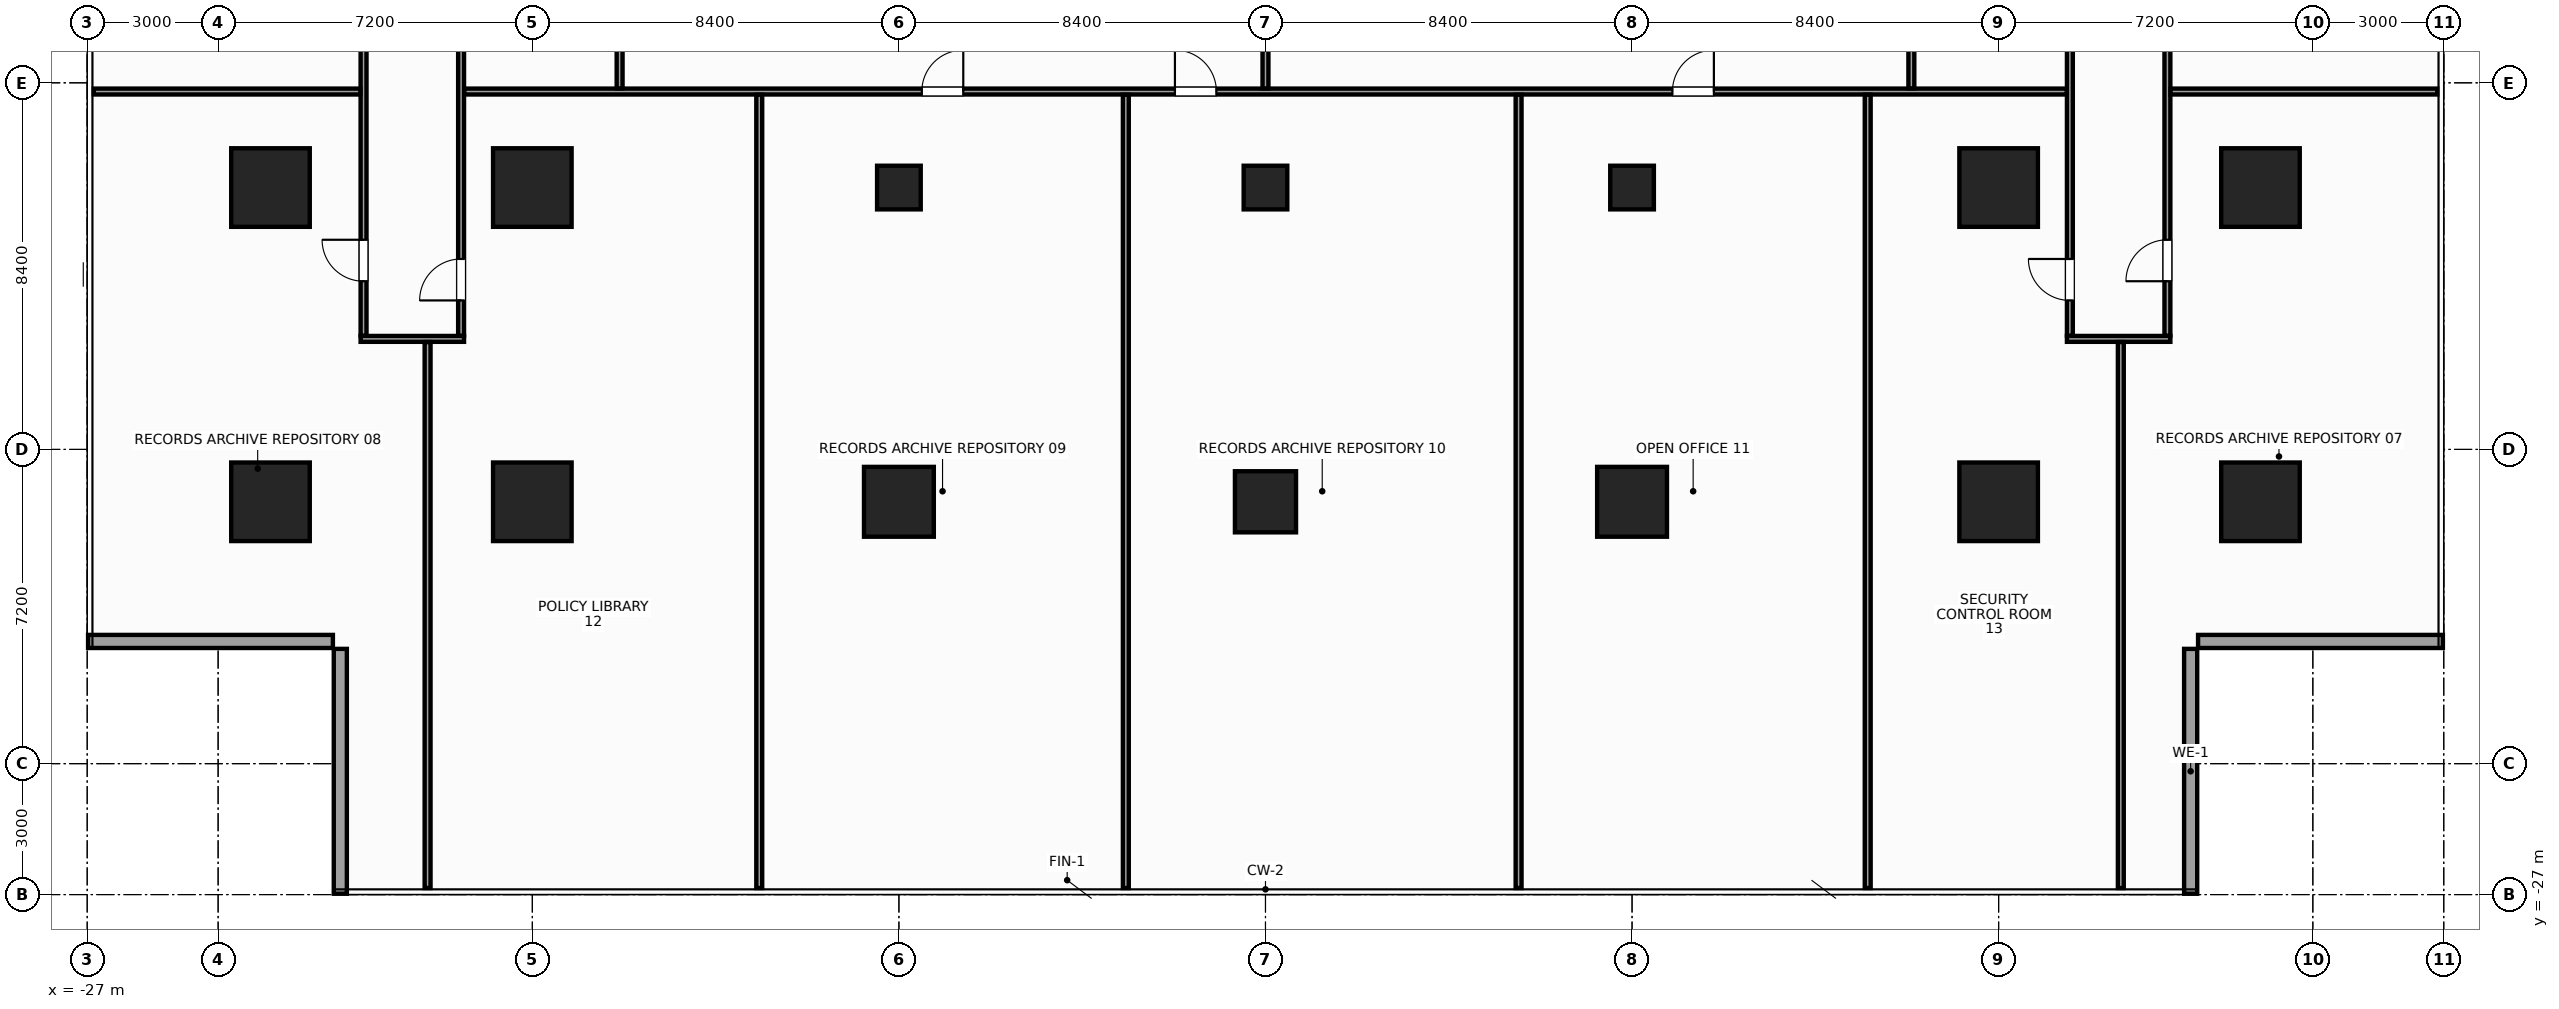
"""IFC4 building model, lengths in metres.
Left out: names, types, materials, properties, quantities, classifications, styles, units other than length and angle.
Written with IfcOpenShell. Run it as: python <this file> out.ifc"""

import sys

from ifc_helpers import new_model, si_unit, direction, frame, frame_2d, origin, origin_2d, place, context, subcontext, project, spatial, rectangle, hollow_rectangle, extrude, source, transform, mapped, element, fill, save


model = new_model("IFC4")
c1 = context("Model", 3, precision=1e-05, world=origin(), true_north=direction((0.0, 1.0)))
c2 = subcontext(c1, "Body", "Model", "MODEL_VIEW")
j1 = project(units=[si_unit("LENGTHUNIT", "METRE"), si_unit("PLANEANGLEUNIT", "RADIAN")], contexts=[c1])
p1 = place(None, origin())
s1 = spatial("IfcSite", under=j1, at=p1, CompositionType="ELEMENT")
p2 = place(p1, origin())
s2 = spatial("IfcBuilding", under=s1, at=p2, CompositionType="ELEMENT")
p3 = place(p2, frame((0.0, 0.0, 41.6)))
s3 = spatial("IfcBuildingStorey", under=s2, at=p3, CompositionType="ELEMENT", Elevation=41.6)
m1 = source(origin(), c2, "Body", "SweptSolid", [
    extrude(rectangle(XDim=1.8, YDim=1.8, at=origin_2d()), origin(), (0.0, 0.0, 1.0), 3.6),
])
for number, where, z_axis, x_axis in (
    (1, (-16.8, -18.0, 0.0), (0.0, 0.0, 1.0), (1.0, 0.0, 0.0)),
    (2, (-16.8, -10.8, 0.0), (0.0, 0.0, 1.0), (1.0, 0.0, 0.0)),
    (3, (16.8, -18.0, 0.0), (0.0, 0.0, 1.0), (1.0, 0.0, 0.0)),
    (4, (16.8, -10.8, 0.0), (0.0, 0.0, 1.0), (1.0, 0.0, 0.0)),
    (5, (-22.8, -18.0, 0.0), (0.0, 0.0, 1.0), (1.0, 0.0, 0.0)),
    (6, (-22.8, -10.8, 0.0), (0.0, 0.0, 1.0), (1.0, 0.0, 0.0)),
    (7, (22.8, -18.0, 0.0), (0.0, 0.0, 1.0), (1.0, 0.0, 0.0)),
    (8, (22.8, -10.8, 0.0), (0.0, 0.0, 1.0), (1.0, 0.0, 0.0)),
):
    element("IfcColumn", number, at=place(p3, frame(where, z_axis=z_axis, x_axis=x_axis)), inside=s3, PredefinedType="COLUMN", context=c2, shape_type="MappedRepresentation", body=[
        mapped(m1, transform((0.0, 0.0, 0.0), x_axis=(1.0, 0.0, 0.0), y_axis=(0.0, 1.0, 0.0), z_axis=(0.0, 0.0, 1.0), scale=1.0)),
    ])
m2 = source(origin(), c2, "Body", "SweptSolid", [
    extrude(rectangle(XDim=1.6, YDim=1.6, at=origin_2d()), origin(), (0.0, 0.0, 1.0), 3.6),
])
p4 = place(p3, frame((-8.4, -18.0, 0.0), z_axis=(0.0, 0.0, 1.0), x_axis=(1.0, 0.0, 0.0)))
e9 = element("IfcColumn", 9, at=p4, inside=s3, PredefinedType="COLUMN", context=c2, shape_type="MappedRepresentation", body=[
    mapped(m2, transform((0.0, 0.0, 0.0), x_axis=(1.0, 0.0, 0.0), y_axis=(0.0, 1.0, 0.0), z_axis=(0.0, 0.0, 1.0), scale=1.0)),
])
m3 = source(origin(), c2, "Body", "SweptSolid", [
    extrude(hollow_rectangle(XDim=1.0, YDim=1.0, WallThickness=0.045, at=origin_2d()), origin(), (0.0, 0.0, 1.0), 3.6),
])
p5 = place(p3, frame((-8.4, -10.8, 0.0), z_axis=(0.0, 0.0, 1.0), x_axis=(1.0, 0.0, 0.0)))
e10 = element("IfcColumn", 10, at=p5, inside=s3, PredefinedType="COLUMN", context=c2, shape_type="MappedRepresentation", body=[
    mapped(m3, transform((0.0, 0.0, 0.0), x_axis=(1.0, 0.0, 0.0), y_axis=(0.0, 1.0, 0.0), z_axis=(0.0, 0.0, 1.0), scale=1.0)),
])
p6 = place(p3, frame((8.4, -18.0, 0.0), z_axis=(0.0, 0.0, 1.0), x_axis=(1.0, 0.0, 0.0)))
e11 = element("IfcColumn", 11, at=p6, inside=s3, PredefinedType="COLUMN", context=c2, shape_type="MappedRepresentation", body=[
    mapped(m2, transform((0.0, 0.0, 0.0), x_axis=(1.0, 0.0, 0.0), y_axis=(0.0, 1.0, 0.0), z_axis=(0.0, 0.0, 1.0), scale=1.0)),
])
p7 = place(p3, frame((8.4, -10.8, 0.0), z_axis=(0.0, 0.0, 1.0), x_axis=(1.0, 0.0, 0.0)))
e12 = element("IfcColumn", 12, at=p7, inside=s3, PredefinedType="COLUMN", context=c2, shape_type="MappedRepresentation", body=[
    mapped(m3, transform((0.0, 0.0, 0.0), x_axis=(1.0, 0.0, 0.0), y_axis=(0.0, 1.0, 0.0), z_axis=(0.0, 0.0, 1.0), scale=1.0)),
])
m4 = source(origin(), c2, "Body", "SweptSolid", [
    extrude(rectangle(XDim=1.4, YDim=1.4, at=origin_2d()), origin(), (0.0, 0.0, 1.0), 3.6),
])
p8 = place(p3, frame((0.0, -18.0, 0.0), z_axis=(0.0, 0.0, 1.0), x_axis=(1.0, 0.0, 0.0)))
e13 = element("IfcColumn", 13, at=p8, inside=s3, PredefinedType="COLUMN", context=c2, shape_type="MappedRepresentation", body=[
    mapped(m4, transform((0.0, 0.0, 0.0), x_axis=(1.0, 0.0, 0.0), y_axis=(0.0, 1.0, 0.0), z_axis=(0.0, 0.0, 1.0), scale=1.0)),
])
m5 = source(origin(), c2, "Body", "SweptSolid", [
    extrude(rectangle(XDim=1.0, YDim=1.0, at=origin_2d()), origin(), (0.0, 0.0, 1.0), 3.6),
])
p9 = place(p3, frame((0.0, -10.8, 0.0), z_axis=(0.0, 0.0, 1.0), x_axis=(1.0, 0.0, 0.0)))
e14 = element("IfcColumn", 14, at=p9, inside=s3, PredefinedType="COLUMN", context=c2, shape_type="MappedRepresentation", body=[
    mapped(m5, transform((0.0, 0.0, 0.0), x_axis=(1.0, 0.0, 0.0), y_axis=(0.0, 1.0, 0.0), z_axis=(0.0, 0.0, 1.0), scale=1.0)),
])
m6 = source(origin(), c2, "Body", "SweptSolid", [
    extrude(rectangle(XDim=5.61, YDim=0.3, at=frame_2d((2.805, 0.0))), origin(), (0.0, 0.0, 1.0), 2.74),
])
for number, where, z_axis, x_axis in (
    (15, (21.2, -26.98, 0.0), (0.0, 0.0, 1.0), (0.0, 1.0, 0.0)),
    (16, (21.37, -21.2, 0.0), (0.0, 0.0, 1.0), (1.0, 0.0, 0.0)),
    (17, (-26.98, -21.2, 0.0), (0.0, 0.0, 1.0), (1.0, 0.0, 0.0)),
    (18, (-21.2, -21.37, 0.0), (0.0, 0.0, 1.0), (0.0, -1.0, 0.0)),
):
    element("IfcWall", number, at=place(p3, frame(where, z_axis=z_axis, x_axis=x_axis)), inside=s3, PredefinedType="STANDARD", context=c2, shape_type="MappedRepresentation", body=[
        mapped(m6, transform((0.0, 0.0, 0.0), x_axis=(1.0, 0.0, 0.0), y_axis=(0.0, 1.0, 0.0), z_axis=(0.0, 0.0, 1.0), scale=1.0)),
    ])
m7 = source(origin(), c2, "Body", "SweptSolid", [
    extrude(rectangle(XDim=2.37, YDim=0.135, at=frame_2d((1.185, 0.0))), origin(), (0.0, 0.0, 1.0), 2.845),
])
for number, where, z_axis, x_axis in (
    (19, (-20.735, -14.268, 0.0), (0.0, 0.0, 1.0), (1.0, 0.0, 0.0)),
    (20, (18.365, -14.268, 0.0), (0.0, 0.0, 1.0), (1.0, 0.0, 0.0)),
):
    element("IfcWall", number, at=place(p3, frame(where, z_axis=z_axis, x_axis=x_axis)), inside=s3, PredefinedType="PARTITIONING", context=c2, shape_type="MappedRepresentation", body=[
        mapped(m7, transform((0.0, 0.0, 0.0), x_axis=(1.0, 0.0, 0.0), y_axis=(0.0, 1.0, 0.0), z_axis=(0.0, 0.0, 1.0), scale=1.0)),
    ])
m8 = source(origin(), c2, "Body", "SweptSolid", [
    extrude(rectangle(XDim=24.123, YDim=0.135, at=frame_2d((12.061, 0.0))), origin(), (0.0, 0.0, 1.0), 2.745),
])
p10 = place(p3, frame((-20.667, -14.195, 0.0), z_axis=(0.0, 0.0, 1.0), x_axis=(0.0, 1.0, 0.0)))
e21 = element("IfcWall", 21, at=p10, inside=s3, PredefinedType="PARTITIONING", context=c2, shape_type="MappedRepresentation", body=[
    mapped(m8, transform((0.0, 0.0, 0.0), x_axis=(1.0, 0.0, 0.0), y_axis=(0.0, 1.0, 0.0), z_axis=(0.0, 0.0, 1.0), scale=1.0)),
])
p11 = place(p10, frame((15.238, 0.0, 0.0)))
e22 = element("IfcOpeningElement", 22, at=p11, cuts=e21, PredefinedType="OPENING", context=c2, shape_type="SweptSolid", body=[
    extrude(rectangle(XDim=0.95, YDim=2.15, at=frame_2d((0.475, 1.075))), frame((0.0, 0.08, 0.0), z_axis=(0.0, -1.0, 0.0), x_axis=(1.0, 0.0, 0.0)), (0.0, 0.0, 1.0), 0.159),
])
p12 = place(p10, frame((1.249, 0.0, 0.0)))
e23 = element("IfcOpeningElement", 23, at=p12, cuts=e21, PredefinedType="OPENING", context=c2, shape_type="SweptSolid", body=[
    extrude(rectangle(XDim=0.95, YDim=2.15, at=frame_2d((0.475, 1.075))), frame((0.0, 0.08, 0.0), z_axis=(0.0, -1.0, 0.0), x_axis=(1.0, 0.0, 0.0)), (0.0, 0.0, 1.0), 0.159),
])
m9 = source(origin(), c2, "Body", "SweptSolid", [
    extrude(rectangle(XDim=21.995, YDim=0.135, at=frame_2d((10.998, 0.0))), origin(), (0.0, 0.0, 1.0), 2.745),
])
p13 = place(p3, frame((-18.433, -14.195, 0.0), z_axis=(0.0, 0.0, 1.0), x_axis=(0.0, 1.0, 0.0)))
e24 = element("IfcWall", 24, at=p13, inside=s3, PredefinedType="PARTITIONING", context=c2, shape_type="MappedRepresentation", body=[
    mapped(m9, transform((0.0, 0.0, 0.0), x_axis=(1.0, 0.0, 0.0), y_axis=(0.0, 1.0, 0.0), z_axis=(0.0, 0.0, 1.0), scale=1.0)),
])
p14 = place(p13, frame((0.809, 0.0, 0.0)))
e25 = element("IfcOpeningElement", 25, at=p14, cuts=e24, PredefinedType="OPENING", context=c2, shape_type="SweptSolid", body=[
    extrude(rectangle(XDim=0.95, YDim=2.15, at=frame_2d((0.475, 1.075))), frame((0.0, 0.08, 0.0), z_axis=(0.0, -1.0, 0.0), x_axis=(1.0, 0.0, 0.0)), (0.0, 0.0, 1.0), 0.159),
])
p15 = place(p3, frame((18.433, -14.195, 0.0), z_axis=(0.0, 0.0, 1.0), x_axis=(0.0, 1.0, 0.0)))
e26 = element("IfcWall", 26, at=p15, inside=s3, PredefinedType="PARTITIONING", context=c2, shape_type="MappedRepresentation", body=[
    mapped(m9, transform((0.0, 0.0, 0.0), x_axis=(1.0, 0.0, 0.0), y_axis=(0.0, 1.0, 0.0), z_axis=(0.0, 0.0, 1.0), scale=1.0)),
])
p16 = place(p15, frame((0.809, 0.0, 0.0)))
e27 = element("IfcOpeningElement", 27, at=p16, cuts=e26, PredefinedType="OPENING", context=c2, shape_type="SweptSolid", body=[
    extrude(rectangle(XDim=0.95, YDim=2.15, at=frame_2d((0.475, 1.075))), frame((0.0, 0.08, 0.0), z_axis=(0.0, -1.0, 0.0), x_axis=(1.0, 0.0, 0.0)), (0.0, 0.0, 1.0), 0.159),
])
p17 = place(p3, frame((20.667, -14.195, 0.0), z_axis=(0.0, 0.0, 1.0), x_axis=(0.0, 1.0, 0.0)))
e28 = element("IfcWall", 28, at=p17, inside=s3, PredefinedType="PARTITIONING", context=c2, shape_type="MappedRepresentation", body=[
    mapped(m8, transform((0.0, 0.0, 0.0), x_axis=(1.0, 0.0, 0.0), y_axis=(0.0, 1.0, 0.0), z_axis=(0.0, 0.0, 1.0), scale=1.0)),
])
p18 = place(p17, frame((15.238, 0.0, 0.0)))
e29 = element("IfcOpeningElement", 29, at=p18, cuts=e28, PredefinedType="OPENING", context=c2, shape_type="SweptSolid", body=[
    extrude(rectangle(XDim=0.95, YDim=2.15, at=frame_2d((0.475, 1.075))), frame((0.0, 0.08, 0.0), z_axis=(0.0, -1.0, 0.0), x_axis=(1.0, 0.0, 0.0)), (0.0, 0.0, 1.0), 0.159),
])
p19 = place(p17, frame((1.249, 0.0, 0.0)))
e30 = element("IfcOpeningElement", 30, at=p19, cuts=e28, PredefinedType="OPENING", context=c2, shape_type="SweptSolid", body=[
    extrude(rectangle(XDim=0.95, YDim=2.15, at=frame_2d((0.475, 1.075))), frame((0.0, 0.08, 0.0), z_axis=(0.0, -1.0, 0.0), x_axis=(1.0, 0.0, 0.0)), (0.0, 0.0, 1.0), 0.159),
])
m10 = source(origin(), c2, "Body", "SweptSolid", [
    extrude(rectangle(XDim=6.11, YDim=0.135, at=frame_2d((3.055, 0.0))), origin(), (0.0, 0.0, 1.0), 2.745),
])
p20 = place(p3, frame((-26.85, -8.6, 0.0), z_axis=(0.0, 0.0, 1.0), x_axis=(1.0, 0.0, 0.0)))
e31 = element("IfcWall", 31, at=p20, inside=s3, PredefinedType="PARTITIONING", context=c2, shape_type="MappedRepresentation", body=[
    mapped(m10, transform((0.0, 0.0, 0.0), x_axis=(1.0, 0.0, 0.0), y_axis=(0.0, 1.0, 0.0), z_axis=(0.0, 0.0, 1.0), scale=1.0)),
])
m11 = source(origin(), c2, "Body", "SweptSolid", [
    extrude(rectangle(XDim=36.72, YDim=0.135, at=frame_2d((18.36, 0.0))), origin(), (0.0, 0.0, 1.0), 2.745),
])
p21 = place(p3, frame((-18.36, -8.6, 0.0), z_axis=(0.0, 0.0, 1.0), x_axis=(1.0, 0.0, 0.0)))
e32 = element("IfcWall", 32, at=p21, inside=s3, PredefinedType="PARTITIONING", context=c2, shape_type="MappedRepresentation", body=[
    mapped(m11, transform((0.0, 0.0, 0.0), x_axis=(1.0, 0.0, 0.0), y_axis=(0.0, 1.0, 0.0), z_axis=(0.0, 0.0, 1.0), scale=1.0)),
])
p22 = place(p21, frame((10.485, 0.0, 0.0)))
e33 = element("IfcOpeningElement", 33, at=p22, cuts=e32, PredefinedType="OPENING", context=c2, shape_type="SweptSolid", body=[
    extrude(rectangle(XDim=0.95, YDim=2.15, at=frame_2d((0.475, 1.075))), frame((0.0, 0.08, 0.0), z_axis=(0.0, -1.0, 0.0), x_axis=(1.0, 0.0, 0.0)), (0.0, 0.0, 1.0), 0.159),
])
p23 = place(p21, frame((16.285, 0.0, 0.0)))
e34 = element("IfcOpeningElement", 34, at=p23, cuts=e32, PredefinedType="OPENING", context=c2, shape_type="SweptSolid", body=[
    extrude(rectangle(XDim=0.95, YDim=2.15, at=frame_2d((0.475, 1.075))), frame((0.0, 0.08, 0.0), z_axis=(0.0, -1.0, 0.0), x_axis=(1.0, 0.0, 0.0)), (0.0, 0.0, 1.0), 0.159),
])
p24 = place(p21, frame((27.685, 0.0, 0.0)))
e35 = element("IfcOpeningElement", 35, at=p24, cuts=e32, PredefinedType="OPENING", context=c2, shape_type="SweptSolid", body=[
    extrude(rectangle(XDim=0.95, YDim=2.15, at=frame_2d((0.475, 1.075))), frame((0.0, 0.08, 0.0), z_axis=(0.0, -1.0, 0.0), x_axis=(1.0, 0.0, 0.0)), (0.0, 0.0, 1.0), 0.159),
])
p25 = place(p3, frame((20.74, -8.6, 0.0), z_axis=(0.0, 0.0, 1.0), x_axis=(1.0, 0.0, 0.0)))
e36 = element("IfcWall", 36, at=p25, inside=s3, PredefinedType="PARTITIONING", context=c2, shape_type="MappedRepresentation", body=[
    mapped(m10, transform((0.0, 0.0, 0.0), x_axis=(1.0, 0.0, 0.0), y_axis=(0.0, 1.0, 0.0), z_axis=(0.0, 0.0, 1.0), scale=1.0)),
])
m12 = source(origin(), c2, "Body", "SweptSolid", [
    extrude(rectangle(XDim=16.188, YDim=0.135, at=frame_2d((8.094, 0.0))), origin(), (0.0, 0.0, 1.0), 2.37),
])
p26 = place(p3, frame((-14.8, -8.528, 0.0), z_axis=(0.0, 0.0, 1.0), x_axis=(0.0, 1.0, 0.0)))
e37 = element("IfcWall", 37, at=p26, inside=s3, PredefinedType="PARTITIONING", context=c2, shape_type="MappedRepresentation", body=[
    mapped(m12, transform((0.0, 0.0, 0.0), x_axis=(1.0, 0.0, 0.0), y_axis=(0.0, 1.0, 0.0), z_axis=(0.0, 0.0, 1.0), scale=1.0)),
])
m13 = source(origin(), c2, "Body", "SweptSolid", [
    extrude(rectangle(XDim=8.018, YDim=0.135, at=frame_2d((4.009, 0.0))), origin(), (0.0, 0.0, 1.0), 2.745),
])
p27 = place(p3, frame((0.0, -8.528, 0.0), z_axis=(0.0, 0.0, 1.0), x_axis=(0.0, 1.0, 0.0)))
e38 = element("IfcWall", 38, at=p27, inside=s3, PredefinedType="PARTITIONING", context=c2, shape_type="MappedRepresentation", body=[
    mapped(m13, transform((0.0, 0.0, 0.0), x_axis=(1.0, 0.0, 0.0), y_axis=(0.0, 1.0, 0.0), z_axis=(0.0, 0.0, 1.0), scale=1.0)),
])
p28 = place(p3, frame((14.8, -8.528, 0.0), z_axis=(0.0, 0.0, 1.0), x_axis=(0.0, 1.0, 0.0)))
e39 = element("IfcWall", 39, at=p28, inside=s3, PredefinedType="PARTITIONING", context=c2, shape_type="MappedRepresentation", body=[
    mapped(m12, transform((0.0, 0.0, 0.0), x_axis=(1.0, 0.0, 0.0), y_axis=(0.0, 1.0, 0.0), z_axis=(0.0, 0.0, 1.0), scale=1.0)),
])
m14 = source(origin(), c2, "Body", "SweptSolid", [
    extrude(rectangle(XDim=12.51, YDim=0.135, at=frame_2d((6.255, 0.0))), origin(), (0.0, 0.0, 1.0), 2.745),
])
p29 = place(p3, frame((-19.2, -26.85, 0.0), z_axis=(0.0, 0.0, 1.0), x_axis=(0.0, 1.0, 0.0)))
e40 = element("IfcWall", 40, at=p29, inside=s3, PredefinedType="PARTITIONING", context=c2, shape_type="MappedRepresentation", body=[
    mapped(m14, transform((0.0, 0.0, 0.0), x_axis=(1.0, 0.0, 0.0), y_axis=(0.0, 1.0, 0.0), z_axis=(0.0, 0.0, 1.0), scale=1.0)),
])
m15 = source(origin(), c2, "Body", "SweptSolid", [
    extrude(rectangle(XDim=18.177, YDim=0.135, at=frame_2d((9.089, 0.0))), origin(), (0.0, 0.0, 1.0), 2.745),
])
for number, where, z_axis, x_axis in (
    (41, (-11.6, -26.85, 0.0), (0.0, 0.0, 1.0), (0.0, 1.0, 0.0)),
    (42, (-3.2, -26.85, 0.0), (0.0, 0.0, 1.0), (0.0, 1.0, 0.0)),
    (43, (5.8, -26.85, 0.0), (0.0, 0.0, 1.0), (0.0, 1.0, 0.0)),
    (44, (13.8, -26.85, 0.0), (0.0, 0.0, 1.0), (0.0, 1.0, 0.0)),
):
    element("IfcWall", number, at=place(p3, frame(where, z_axis=z_axis, x_axis=x_axis)), inside=s3, PredefinedType="PARTITIONING", context=c2, shape_type="MappedRepresentation", body=[
        mapped(m15, transform((0.0, 0.0, 0.0), x_axis=(1.0, 0.0, 0.0), y_axis=(0.0, 1.0, 0.0), z_axis=(0.0, 0.0, 1.0), scale=1.0)),
    ])
p30 = place(p3, frame((19.6, -26.85, 0.0), z_axis=(0.0, 0.0, 1.0), x_axis=(0.0, 1.0, 0.0)))
e45 = element("IfcWall", 45, at=p30, inside=s3, PredefinedType="PARTITIONING", context=c2, shape_type="MappedRepresentation", body=[
    mapped(m14, transform((0.0, 0.0, 0.0), x_axis=(1.0, 0.0, 0.0), y_axis=(0.0, 1.0, 0.0), z_axis=(0.0, 0.0, 1.0), scale=1.0)),
])
m16 = source(origin(), c2, "Body", "SweptSolid", [
    extrude(rectangle(XDim=0.95, YDim=2.15, at=frame_2d((0.475, 1.075))), frame((0.0, 0.025, 0.0), z_axis=(0.0, -1.0, 0.0), x_axis=(1.0, 0.0, 0.0)), (0.0, 0.0, 1.0), 0.05),
])
p31 = place(p19, origin())
e46 = element("IfcDoor", 46, at=p31, inside=s3, OperationType="SINGLE_SWING_LEFT", PredefinedType="DOOR", context=c2, shape_type="MappedRepresentation", body=[
    mapped(m16, transform((0.0, 0.0, 0.0), x_axis=(1.0, 0.0, 0.0), y_axis=(0.0, 1.0, 0.0), z_axis=(0.0, 0.0, 1.0), scale=1.0)),
])
fill(e30, e46)
p32 = place(p12, origin())
e47 = element("IfcDoor", 47, at=p32, inside=s3, OperationType="SINGLE_SWING_RIGHT", PredefinedType="DOOR", context=c2, shape_type="MappedRepresentation", body=[
    mapped(m16, transform((0.0, 0.0, 0.0), x_axis=(1.0, 0.0, 0.0), y_axis=(0.0, 1.0, 0.0), z_axis=(0.0, 0.0, 1.0), scale=1.0)),
])
fill(e23, e47)
p33 = place(p14, origin())
e48 = element("IfcDoor", 48, at=p33, inside=s3, OperationType="SINGLE_SWING_LEFT", PredefinedType="DOOR", context=c2, shape_type="MappedRepresentation", body=[
    mapped(m16, transform((0.0, 0.0, 0.0), x_axis=(1.0, 0.0, 0.0), y_axis=(0.0, 1.0, 0.0), z_axis=(0.0, 0.0, 1.0), scale=1.0)),
])
fill(e25, e48)
p34 = place(p16, origin())
e49 = element("IfcDoor", 49, at=p34, inside=s3, OperationType="SINGLE_SWING_RIGHT", PredefinedType="DOOR", context=c2, shape_type="MappedRepresentation", body=[
    mapped(m16, transform((0.0, 0.0, 0.0), x_axis=(1.0, 0.0, 0.0), y_axis=(0.0, 1.0, 0.0), z_axis=(0.0, 0.0, 1.0), scale=1.0)),
])
fill(e27, e49)
p35 = place(p22, origin())
e50 = element("IfcDoor", 50, at=p35, inside=s3, OperationType="SINGLE_SWING_RIGHT", PredefinedType="DOOR", context=c2, shape_type="MappedRepresentation", body=[
    mapped(m16, transform((0.0, 0.0, 0.0), x_axis=(1.0, 0.0, 0.0), y_axis=(0.0, 1.0, 0.0), z_axis=(0.0, 0.0, 1.0), scale=1.0)),
])
fill(e33, e50)
p36 = place(p23, origin())
e51 = element("IfcDoor", 51, at=p36, inside=s3, OperationType="SINGLE_SWING_LEFT", PredefinedType="DOOR", context=c2, shape_type="MappedRepresentation", body=[
    mapped(m16, transform((0.0, 0.0, 0.0), x_axis=(1.0, 0.0, 0.0), y_axis=(0.0, 1.0, 0.0), z_axis=(0.0, 0.0, 1.0), scale=1.0)),
])
fill(e34, e51)
p37 = place(p24, origin())
e52 = element("IfcDoor", 52, at=p37, inside=s3, OperationType="SINGLE_SWING_RIGHT", PredefinedType="DOOR", context=c2, shape_type="MappedRepresentation", body=[
    mapped(m16, transform((0.0, 0.0, 0.0), x_axis=(1.0, 0.0, 0.0), y_axis=(0.0, 1.0, 0.0), z_axis=(0.0, 0.0, 1.0), scale=1.0)),
])
fill(e35, e52)
save(model, sys.argv[1])
